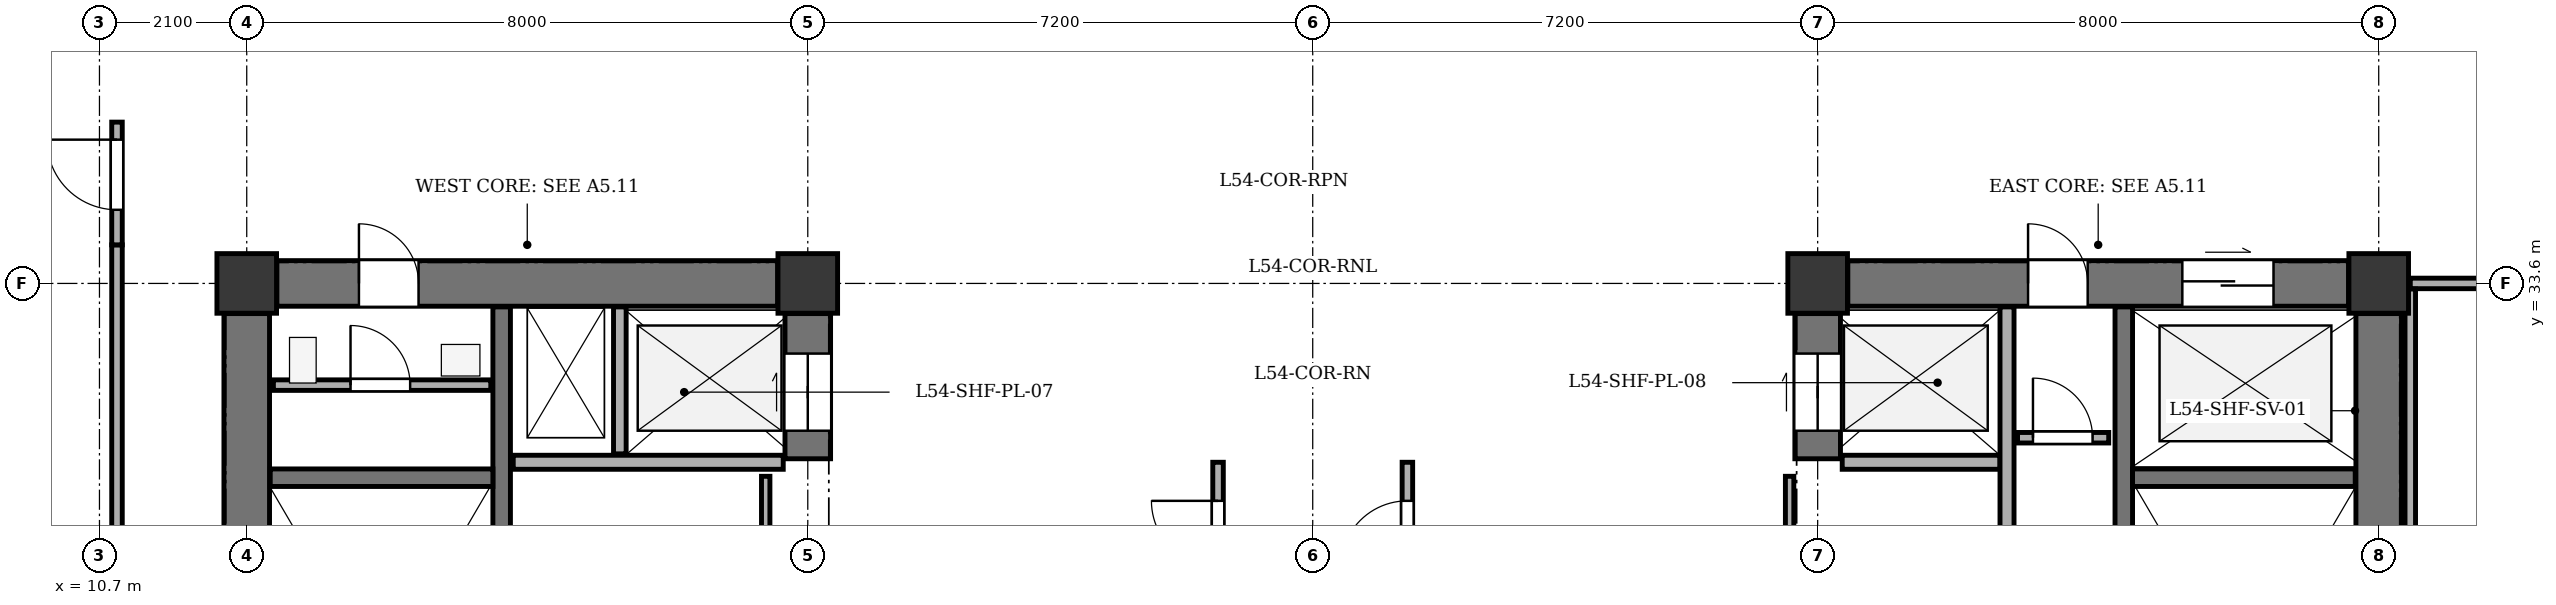
"""IFC4 building model, lengths in metres.
Left out: names, types, materials, properties, quantities, classifications, styles, units other than length and angle.
Written with IfcOpenShell. Run it as: python <this file> out.ifc"""

import sys

from ifc_helpers import new_model, si_unit, direction, frame, frame_2d, origin, origin_2d, place, context, subcontext, project, spatial, rectangle, extrude, element, fill, save


model = new_model("IFC4")
c1 = context("Model", 3, precision=1e-05, world=origin(), true_north=direction((0.0, 1.0)))
c2 = subcontext(c1, "Body", "Model", "MODEL_VIEW")
j1 = project(units=[si_unit("LENGTHUNIT", "METRE"), si_unit("PLANEANGLEUNIT", "RADIAN")], contexts=[c1])
p1 = place(None, origin())
s1 = spatial("IfcSite", under=j1, at=p1, CompositionType="ELEMENT")
p2 = place(p1, origin())
s2 = spatial("IfcBuilding", under=s1, at=p2, CompositionType="ELEMENT")
p3 = place(p2, frame((0.0, 0.0, 210.9)))
s3 = spatial("IfcBuildingStorey", under=s2, at=p3, CompositionType="ELEMENT", Elevation=210.9)
for number, where, z_axis, x_axis in (
    (1, (12.8, 33.6, 0.0), (0.0, 0.0, 1.0), (1.0, 0.0, 0.0)),
    (2, (20.8, 33.6, 0.0), (0.0, 0.0, 1.0), (1.0, 0.0, 0.0)),
    (3, (35.2, 33.6, 0.0), (0.0, 0.0, 1.0), (1.0, 0.0, 0.0)),
    (4, (43.2, 33.6, 0.0), (0.0, 0.0, 1.0), (1.0, 0.0, 0.0)),
):
    element("IfcColumn", number, at=place(p3, frame(where, z_axis=z_axis, x_axis=x_axis)), inside=s3, PredefinedType="COLUMN", context=c2, shape_type="SweptSolid", body=[
        extrude(rectangle(XDim=0.85, YDim=0.85, at=origin_2d()), origin(), (0.0, 0.0, 1.0), 3.4),
    ])
p4 = place(p3, frame((12.8, 21.23, 0.0), z_axis=(0.0, 0.0, 1.0), x_axis=(0.0, 1.0, 0.0)))
e5 = element("IfcWall", 5, at=p4, inside=s3, PredefinedType="SHEAR", context=c2, shape_type="SweptSolid", body=[
    extrude(rectangle(XDim=11.94, YDim=0.65, at=frame_2d((5.97, 0.0))), origin(), (0.0, 0.0, 1.0), 3.1),
])
p5 = place(p3, frame((13.23, 33.6, 0.0), z_axis=(0.0, 0.0, 1.0), x_axis=(1.0, 0.0, 0.0)))
e6 = element("IfcWall", 6, at=p5, inside=s3, PredefinedType="SHEAR", context=c2, shape_type="SweptSolid", body=[
    extrude(rectangle(XDim=7.14, YDim=0.65, at=frame_2d((3.57, 0.0))), origin(), (0.0, 0.0, 1.0), 3.1),
])
p6 = place(p5, frame((1.17, 0.0, 0.0)))
e7 = element("IfcOpeningElement", 7, at=p6, cuts=e6, PredefinedType="OPENING", context=c2, shape_type="SweptSolid", body=[
    extrude(rectangle(XDim=0.85, YDim=2.02, at=frame_2d((0.425, 1.01))), frame((0.0, 0.335, 0.0), z_axis=(0.0, -1.0, 0.0), x_axis=(1.0, 0.0, 0.0)), (0.0, 0.0, 1.0), 0.67),
])
p7 = place(p3, frame((20.8, 31.1, 0.0), z_axis=(0.0, 0.0, 1.0), x_axis=(0.0, 1.0, 0.0)))
e8 = element("IfcWall", 8, at=p7, inside=s3, PredefinedType="SHEAR", context=c2, shape_type="SweptSolid", body=[
    extrude(rectangle(XDim=2.07, YDim=0.65, at=frame_2d((1.035, 0.0))), origin(), (0.0, 0.0, 1.0), 3.1),
])
p8 = place(p7, frame((0.4, 0.0, 0.0)))
e9 = element("IfcOpeningElement", 9, at=p8, cuts=e8, PredefinedType="OPENING", context=c2, shape_type="SweptSolid", body=[
    extrude(rectangle(XDim=1.1, YDim=2.1, at=frame_2d((0.55, 1.05))), frame((0.0, 0.335, 0.0), z_axis=(0.0, -1.0, 0.0), x_axis=(1.0, 0.0, 0.0)), (0.0, 0.0, 1.0), 0.67),
])
p9 = place(p3, frame((16.435, 21.135, 0.0), z_axis=(0.0, 0.0, 1.0), x_axis=(0.0, 1.0, 0.0)))
e10 = element("IfcWall", 10, at=p9, inside=s3, PredefinedType="SHEAR", context=c2, shape_type="SweptSolid", body=[
    extrude(rectangle(XDim=12.13, YDim=0.25, at=frame_2d((6.065, 0.0))), origin(), (0.0, 0.0, 1.0), 3.1),
])
p10 = place(p9, frame((0.515, 0.0, 0.0)))
e11 = element("IfcOpeningElement", 11, at=p10, cuts=e10, PredefinedType="OPENING", context=c2, shape_type="SweptSolid", body=[
    extrude(rectangle(XDim=1.2, YDim=2.15, at=frame_2d((0.6, 1.075))), frame((0.0, 0.135, 0.0), z_axis=(0.0, -1.0, 0.0), x_axis=(1.0, 0.0, 0.0)), (0.0, 0.0, 1.0), 0.27),
])
p11 = place(p9, frame((2.665, 0.0, 0.0)))
e12 = element("IfcOpeningElement", 12, at=p11, cuts=e10, PredefinedType="OPENING", context=c2, shape_type="SweptSolid", body=[
    extrude(rectangle(XDim=1.15, YDim=2.15, at=frame_2d((0.575, 1.075))), frame((0.0, 0.135, 0.0), z_axis=(0.0, -1.0, 0.0), x_axis=(1.0, 0.0, 0.0)), (0.0, 0.0, 1.0), 0.27),
])
p12 = place(p3, frame((13.135, 30.83, 0.0), z_axis=(0.0, 0.0, 1.0), x_axis=(1.0, 0.0, 0.0)))
e13 = element("IfcWall", 13, at=p12, inside=s3, PredefinedType="SHEAR", context=c2, shape_type="SweptSolid", body=[
    extrude(rectangle(XDim=3.175, YDim=0.25, at=frame_2d((1.587, 0.0))), origin(), (0.0, 0.0, 1.0), 3.1),
])
p13 = place(p3, frame((16.6, 31.05, 0.0), z_axis=(0.0, 0.0, 1.0), x_axis=(1.0, 0.0, 0.0)))
e14 = element("IfcWall", 14, at=p13, inside=s3, PredefinedType="SOLIDWALL", context=c2, shape_type="SweptSolid", body=[
    extrude(rectangle(XDim=3.85, YDim=0.2, at=frame_2d((1.925, 0.0))), origin(), (0.0, 0.0, 1.0), 3.1),
])
p14 = place(p3, frame((18.12, 31.17, 0.0), z_axis=(0.0, 0.0, 1.0), x_axis=(0.0, 1.0, 0.0)))
e15 = element("IfcWall", 15, at=p14, inside=s3, PredefinedType="PARTITIONING", context=c2, shape_type="SweptSolid", body=[
    extrude(rectangle(XDim=2.095, YDim=0.18, at=frame_2d((1.047, 0.0))), origin(), (0.0, 0.0, 1.0), 3.1),
])
p15 = place(p3, frame((43.2, 21.23, 0.0), z_axis=(0.0, 0.0, 1.0), x_axis=(0.0, 1.0, 0.0)))
e16 = element("IfcWall", 16, at=p15, inside=s3, PredefinedType="SHEAR", context=c2, shape_type="SweptSolid", body=[
    extrude(rectangle(XDim=11.94, YDim=0.65, at=frame_2d((5.97, 0.0))), origin(), (0.0, 0.0, 1.0), 3.1),
])
p16 = place(p3, frame((35.63, 33.6, 0.0), z_axis=(0.0, 0.0, 1.0), x_axis=(1.0, 0.0, 0.0)))
e17 = element("IfcWall", 17, at=p16, inside=s3, PredefinedType="SHEAR", context=c2, shape_type="SweptSolid", body=[
    extrude(rectangle(XDim=7.14, YDim=0.65, at=frame_2d((3.57, 0.0))), origin(), (0.0, 0.0, 1.0), 3.1),
])
p17 = place(p16, frame((4.77, 0.0, 0.0)))
e18 = element("IfcOpeningElement", 18, at=p17, cuts=e17, PredefinedType="OPENING", context=c2, shape_type="SweptSolid", body=[
    extrude(rectangle(XDim=1.3, YDim=2.15, at=frame_2d((0.65, 1.075))), frame((0.0, 0.335, 0.0), z_axis=(0.0, -1.0, 0.0), x_axis=(1.0, 0.0, 0.0)), (0.0, 0.0, 1.0), 0.67),
])
p18 = place(p16, frame((2.57, 0.0, 0.0)))
e19 = element("IfcOpeningElement", 19, at=p18, cuts=e17, PredefinedType="OPENING", context=c2, shape_type="SweptSolid", body=[
    extrude(rectangle(XDim=0.85, YDim=2.02, at=frame_2d((0.425, 1.01))), frame((0.0, 0.335, 0.0), z_axis=(0.0, -1.0, 0.0), x_axis=(1.0, 0.0, 0.0)), (0.0, 0.0, 1.0), 0.67),
])
p19 = place(p3, frame((35.2, 31.1, 0.0), z_axis=(0.0, 0.0, 1.0), x_axis=(0.0, 1.0, 0.0)))
e20 = element("IfcWall", 20, at=p19, inside=s3, PredefinedType="SHEAR", context=c2, shape_type="SweptSolid", body=[
    extrude(rectangle(XDim=2.07, YDim=0.65, at=frame_2d((1.035, 0.0))), origin(), (0.0, 0.0, 1.0), 3.1),
])
p20 = place(p19, frame((0.4, 0.0, 0.0)))
e21 = element("IfcOpeningElement", 21, at=p20, cuts=e20, PredefinedType="OPENING", context=c2, shape_type="SweptSolid", body=[
    extrude(rectangle(XDim=1.1, YDim=2.1, at=frame_2d((0.55, 1.05))), frame((0.0, 0.335, 0.0), z_axis=(0.0, -1.0, 0.0), x_axis=(1.0, 0.0, 0.0)), (0.0, 0.0, 1.0), 0.67),
])
p21 = place(p3, frame((39.565, 21.135, 0.0), z_axis=(0.0, 0.0, 1.0), x_axis=(0.0, 1.0, 0.0)))
e22 = element("IfcWall", 22, at=p21, inside=s3, PredefinedType="SHEAR", context=c2, shape_type="SweptSolid", body=[
    extrude(rectangle(XDim=12.13, YDim=0.25, at=frame_2d((6.065, 0.0))), origin(), (0.0, 0.0, 1.0), 3.1),
])
p22 = place(p21, frame((0.515, 0.0, 0.0)))
e23 = element("IfcOpeningElement", 23, at=p22, cuts=e22, PredefinedType="OPENING", context=c2, shape_type="SweptSolid", body=[
    extrude(rectangle(XDim=1.2, YDim=2.15, at=frame_2d((0.6, 1.075))), frame((0.0, 0.135, 0.0), z_axis=(0.0, -1.0, 0.0), x_axis=(1.0, 0.0, 0.0)), (0.0, 0.0, 1.0), 0.27),
])
p23 = place(p21, frame((2.665, 0.0, 0.0)))
e24 = element("IfcOpeningElement", 24, at=p23, cuts=e22, PredefinedType="OPENING", context=c2, shape_type="SweptSolid", body=[
    extrude(rectangle(XDim=1.15, YDim=2.15, at=frame_2d((0.575, 1.075))), frame((0.0, 0.135, 0.0), z_axis=(0.0, -1.0, 0.0), x_axis=(1.0, 0.0, 0.0)), (0.0, 0.0, 1.0), 0.27),
])
p24 = place(p3, frame((39.69, 30.83, 0.0), z_axis=(0.0, 0.0, 1.0), x_axis=(1.0, 0.0, 0.0)))
e25 = element("IfcWall", 25, at=p24, inside=s3, PredefinedType="SHEAR", context=c2, shape_type="SweptSolid", body=[
    extrude(rectangle(XDim=3.175, YDim=0.25, at=frame_2d((1.587, 0.0))), origin(), (0.0, 0.0, 1.0), 3.1),
])
p25 = place(p3, frame((35.55, 31.05, 0.0), z_axis=(0.0, 0.0, 1.0), x_axis=(1.0, 0.0, 0.0)))
e26 = element("IfcWall", 26, at=p25, inside=s3, PredefinedType="SOLIDWALL", context=c2, shape_type="SweptSolid", body=[
    extrude(rectangle(XDim=2.25, YDim=0.2, at=frame_2d((1.125, 0.0))), origin(), (0.0, 0.0, 1.0), 3.1),
])
p26 = place(p3, frame((37.9, 25.27, 0.0), z_axis=(0.0, 0.0, 1.0), x_axis=(0.0, 1.0, 0.0)))
e27 = element("IfcWall", 27, at=p26, inside=s3, PredefinedType="SOLIDWALL", context=c2, shape_type="SweptSolid", body=[
    extrude(rectangle(XDim=7.995, YDim=0.2, at=frame_2d((3.998, 0.0))), origin(), (0.0, 0.0, 1.0), 3.1),
])
p27 = place(p3, frame((13.18, 32.15, 0.0), z_axis=(0.0, 0.0, 1.0), x_axis=(1.0, 0.0, 0.0)))
e28 = element("IfcWall", 28, at=p27, inside=s3, PredefinedType="PARTITIONING", context=c2, shape_type="SweptSolid", body=[
    extrude(rectangle(XDim=3.1, YDim=0.15, at=frame_2d((1.55, 0.0))), origin(), (0.0, 0.0, 1.0), 3.1),
])
p28 = place(p27, frame((1.1, 0.0, 0.0)))
e29 = element("IfcOpeningElement", 29, at=p28, cuts=e28, PredefinedType="OPENING", context=c2, shape_type="SweptSolid", body=[
    extrude(rectangle(XDim=0.85, YDim=2.02, at=frame_2d((0.425, 1.01))), frame((0.0, 0.085, 0.0), z_axis=(0.0, -1.0, 0.0), x_axis=(1.0, 0.0, 0.0)), (0.0, 0.0, 1.0), 0.17),
])
p29 = place(p3, frame((38.05, 31.4, 0.0), z_axis=(0.0, 0.0, 1.0), x_axis=(1.0, 0.0, 0.0)))
e30 = element("IfcWall", 30, at=p29, inside=s3, PredefinedType="PARTITIONING", context=c2, shape_type="SweptSolid", body=[
    extrude(rectangle(XDim=1.3, YDim=0.15, at=frame_2d((0.65, 0.0))), origin(), (0.0, 0.0, 1.0), 3.1),
])
p30 = place(p29, frame((0.22, 0.0, 0.0)))
e31 = element("IfcOpeningElement", 31, at=p30, cuts=e30, PredefinedType="OPENING", context=c2, shape_type="SweptSolid", body=[
    extrude(rectangle(XDim=0.85, YDim=2.02, at=frame_2d((0.425, 1.01))), frame((0.0, 0.085, 0.0), z_axis=(0.0, -1.0, 0.0), x_axis=(1.0, 0.0, 0.0)), (0.0, 0.0, 1.0), 0.17),
])
p31 = place(p3, frame((26.65, 25.23, 0.0), z_axis=(0.0, 0.0, 1.0), x_axis=(0.0, 1.0, 0.0)))
e32 = element("IfcWall", 32, at=p31, inside=s3, PredefinedType="PARTITIONING", context=c2, shape_type="SweptSolid", body=[
    extrude(rectangle(XDim=5.82, YDim=0.15, at=frame_2d((2.91, 0.0))), origin(), (0.0, 0.0, 1.0), 3.1),
])
p32 = place(p31, frame((1.42, 0.0, 0.0)))
e33 = element("IfcOpeningElement", 33, at=p32, cuts=e32, PredefinedType="OPENING", context=c2, shape_type="SweptSolid", body=[
    extrude(rectangle(XDim=0.95, YDim=2.1, at=frame_2d((0.475, 1.05))), frame((0.0, 0.085, 0.0), z_axis=(0.0, -1.0, 0.0), x_axis=(1.0, 0.0, 0.0)), (0.0, 0.0, 1.0), 0.17),
])
p33 = place(p31, frame((4.32, 0.0, 0.0)))
e34 = element("IfcOpeningElement", 34, at=p33, cuts=e32, PredefinedType="OPENING", context=c2, shape_type="SweptSolid", body=[
    extrude(rectangle(XDim=0.95, YDim=2.1, at=frame_2d((0.475, 1.05))), frame((0.0, 0.085, 0.0), z_axis=(0.0, -1.0, 0.0), x_axis=(1.0, 0.0, 0.0)), (0.0, 0.0, 1.0), 0.17),
])
p34 = place(p3, frame((20.2, 25.255, 0.0), z_axis=(0.0, 0.0, 1.0), x_axis=(0.0, 1.0, 0.0)))
e35 = element("IfcWall", 35, at=p34, inside=s3, PredefinedType="PARTITIONING", context=c2, shape_type="SweptSolid", body=[
    extrude(rectangle(XDim=5.595, YDim=0.12, at=frame_2d((2.798, 0.0))), origin(), (0.0, 0.0, 1.0), 3.1),
])
p35 = place(p34, frame((0.995, 0.0, 0.0)))
e36 = element("IfcOpeningElement", 36, at=p35, cuts=e35, PredefinedType="OPENING", context=c2, shape_type="SweptSolid", body=[
    extrude(rectangle(XDim=0.9, YDim=2.05, at=frame_2d((0.45, 1.025))), frame((0.0, 0.07, 0.0), z_axis=(0.0, -1.0, 0.0), x_axis=(1.0, 0.0, 0.0)), (0.0, 0.0, 1.0), 0.14),
])
p36 = place(p3, frame((29.35, 25.23, 0.0), z_axis=(0.0, 0.0, 1.0), x_axis=(0.0, 1.0, 0.0)))
e37 = element("IfcWall", 37, at=p36, inside=s3, PredefinedType="PARTITIONING", context=c2, shape_type="SweptSolid", body=[
    extrude(rectangle(XDim=5.82, YDim=0.15, at=frame_2d((2.91, 0.0))), origin(), (0.0, 0.0, 1.0), 3.1),
])
p37 = place(p36, frame((1.42, 0.0, 0.0)))
e38 = element("IfcOpeningElement", 38, at=p37, cuts=e37, PredefinedType="OPENING", context=c2, shape_type="SweptSolid", body=[
    extrude(rectangle(XDim=0.95, YDim=2.1, at=frame_2d((0.475, 1.05))), frame((0.0, 0.085, 0.0), z_axis=(0.0, -1.0, 0.0), x_axis=(1.0, 0.0, 0.0)), (0.0, 0.0, 1.0), 0.17),
])
p38 = place(p36, frame((4.32, 0.0, 0.0)))
e39 = element("IfcOpeningElement", 39, at=p38, cuts=e37, PredefinedType="OPENING", context=c2, shape_type="SweptSolid", body=[
    extrude(rectangle(XDim=0.95, YDim=2.1, at=frame_2d((0.475, 1.05))), frame((0.0, 0.085, 0.0), z_axis=(0.0, -1.0, 0.0), x_axis=(1.0, 0.0, 0.0)), (0.0, 0.0, 1.0), 0.17),
])
p39 = place(p3, frame((34.8, 25.25, 0.0), z_axis=(0.0, 0.0, 1.0), x_axis=(0.0, 1.0, 0.0)))
e40 = element("IfcWall", 40, at=p39, inside=s3, PredefinedType="PARTITIONING", context=c2, shape_type="SweptSolid", body=[
    extrude(rectangle(XDim=5.6, YDim=0.12, at=frame_2d((2.8, 0.0))), origin(), (0.0, 0.0, 1.0), 3.1),
])
p40 = place(p39, frame((1.0, 0.0, 0.0)))
e41 = element("IfcOpeningElement", 41, at=p40, cuts=e40, PredefinedType="OPENING", context=c2, shape_type="SweptSolid", body=[
    extrude(rectangle(XDim=0.9, YDim=2.05, at=frame_2d((0.45, 1.025))), frame((0.0, 0.07, 0.0), z_axis=(0.0, -1.0, 0.0), x_axis=(1.0, 0.0, 0.0)), (0.0, 0.0, 1.0), 0.14),
])
p41 = place(p3, frame((10.95, 20.25, 0.0), z_axis=(0.0, 0.0, 1.0), x_axis=(0.0, 1.0, 0.0)))
e42 = element("IfcWall", 42, at=p41, inside=s3, PredefinedType="PARTITIONING", context=c2, shape_type="SweptSolid", body=[
    extrude(rectangle(XDim=13.9, YDim=0.15, at=frame_2d((6.95, 0.0))), origin(), (0.0, 0.0, 1.0), 3.1),
])
p42 = place(p3, frame((10.95, 34.15, 0.0), z_axis=(0.0, 0.0, 1.0), x_axis=(0.0, 1.0, 0.0)))
e43 = element("IfcWall", 43, at=p42, inside=s3, PredefinedType="PARTITIONING", context=c2, shape_type="SweptSolid", body=[
    extrude(rectangle(XDim=1.75, YDim=0.15, at=frame_2d((0.875, 0.0))), origin(), (0.0, 0.0, 1.0), 3.1),
])
p43 = place(p42, frame((0.5, 0.0, 0.0)))
e44 = element("IfcOpeningElement", 44, at=p43, cuts=e43, PredefinedType="OPENING", context=c2, shape_type="SweptSolid", body=[
    extrude(rectangle(XDim=1.0, YDim=2.1, at=frame_2d((0.5, 1.05))), frame((0.0, 0.085, 0.0), z_axis=(0.0, -1.0, 0.0), x_axis=(1.0, 0.0, 0.0)), (0.0, 0.0, 1.0), 0.17),
])
p44 = place(p3, frame((43.65, 33.6, 0.0), z_axis=(0.0, 0.0, 1.0), x_axis=(1.0, 0.0, 0.0)))
e45 = element("IfcWall", 45, at=p44, inside=s3, PredefinedType="PARTITIONING", context=c2, shape_type="SweptSolid", body=[
    extrude(rectangle(XDim=5.305, YDim=0.15, at=frame_2d((2.653, 0.0))), origin(), (0.0, 0.0, 1.0), 2.535),
])
p45 = place(p3, frame((43.65, 20.25, 0.0), z_axis=(0.0, 0.0, 1.0), x_axis=(0.0, 1.0, 0.0)))
e46 = element("IfcWall", 46, at=p45, inside=s3, PredefinedType="PARTITIONING", context=c2, shape_type="SweptSolid", body=[
    extrude(rectangle(XDim=13.27, YDim=0.15, at=frame_2d((6.635, 0.0))), origin(), (0.0, 0.0, 1.0), 3.1),
])
p46 = place(p6, origin())
e47 = element("IfcDoor", 47, at=p46, inside=s3, OperationType="SINGLE_SWING_LEFT", PredefinedType="DOOR", context=c2, shape_type="SweptSolid", body=[
    extrude(rectangle(XDim=0.85, YDim=2.02, at=frame_2d((0.425, 1.01))), frame((0.0, 0.025, 0.0), z_axis=(0.0, -1.0, 0.0), x_axis=(1.0, 0.0, 0.0)), (0.0, 0.0, 1.0), 0.05),
])
fill(e7, e47)
p47 = place(p8, origin())
e48 = element("IfcDoor", 48, at=p47, inside=s3, OperationType="DOUBLE_DOOR_SLIDING", PredefinedType="DOOR", context=c2, shape_type="SweptSolid", body=[
    extrude(rectangle(XDim=1.1, YDim=2.1, at=frame_2d((0.55, 1.05))), frame((0.0, 0.025, 0.0), z_axis=(0.0, -1.0, 0.0), x_axis=(1.0, 0.0, 0.0)), (0.0, 0.0, 1.0), 0.05),
])
fill(e9, e48)
p48 = place(p17, origin())
e49 = element("IfcDoor", 49, at=p48, inside=s3, OperationType="DOUBLE_DOOR_SLIDING", PredefinedType="DOOR", context=c2, shape_type="SweptSolid", body=[
    extrude(rectangle(XDim=1.3, YDim=2.15, at=frame_2d((0.65, 1.075))), frame((0.0, 0.025, 0.0), z_axis=(0.0, -1.0, 0.0), x_axis=(1.0, 0.0, 0.0)), (0.0, 0.0, 1.0), 0.05),
])
fill(e18, e49)
p49 = place(p18, origin())
e50 = element("IfcDoor", 50, at=p49, inside=s3, OperationType="SINGLE_SWING_LEFT", PredefinedType="DOOR", context=c2, shape_type="SweptSolid", body=[
    extrude(rectangle(XDim=0.85, YDim=2.02, at=frame_2d((0.425, 1.01))), frame((0.0, 0.025, 0.0), z_axis=(0.0, -1.0, 0.0), x_axis=(1.0, 0.0, 0.0)), (0.0, 0.0, 1.0), 0.05),
])
fill(e19, e50)
p50 = place(p20, origin())
e51 = element("IfcDoor", 51, at=p50, inside=s3, OperationType="DOUBLE_DOOR_SLIDING", PredefinedType="DOOR", context=c2, shape_type="SweptSolid", body=[
    extrude(rectangle(XDim=1.1, YDim=2.1, at=frame_2d((0.55, 1.05))), frame((0.0, 0.025, 0.0), z_axis=(0.0, -1.0, 0.0), x_axis=(1.0, 0.0, 0.0)), (0.0, 0.0, 1.0), 0.05),
])
fill(e21, e51)
p51 = place(p28, origin())
e52 = element("IfcDoor", 52, at=p51, inside=s3, OperationType="SINGLE_SWING_LEFT", PredefinedType="DOOR", context=c2, shape_type="SweptSolid", body=[
    extrude(rectangle(XDim=0.85, YDim=2.02, at=frame_2d((0.425, 1.01))), frame((0.0, 0.025, 0.0), z_axis=(0.0, -1.0, 0.0), x_axis=(1.0, 0.0, 0.0)), (0.0, 0.0, 1.0), 0.05),
])
fill(e29, e52)
p52 = place(p30, origin())
e53 = element("IfcDoor", 53, at=p52, inside=s3, OperationType="SINGLE_SWING_LEFT", PredefinedType="DOOR", context=c2, shape_type="SweptSolid", body=[
    extrude(rectangle(XDim=0.85, YDim=2.02, at=frame_2d((0.425, 1.01))), frame((0.0, 0.025, 0.0), z_axis=(0.0, -1.0, 0.0), x_axis=(1.0, 0.0, 0.0)), (0.0, 0.0, 1.0), 0.05),
])
fill(e31, e53)
p53 = place(p33, origin())
e54 = element("IfcDoor", 54, at=p53, inside=s3, OperationType="SINGLE_SWING_RIGHT", PredefinedType="DOOR", context=c2, shape_type="SweptSolid", body=[
    extrude(rectangle(XDim=0.95, YDim=2.1, at=frame_2d((0.475, 1.05))), frame((0.0, 0.025, 0.0), z_axis=(0.0, -1.0, 0.0), x_axis=(1.0, 0.0, 0.0)), (0.0, 0.0, 1.0), 0.05),
])
fill(e34, e54)
p54 = place(p38, origin())
e55 = element("IfcDoor", 55, at=p54, inside=s3, OperationType="SINGLE_SWING_LEFT", PredefinedType="DOOR", context=c2, shape_type="SweptSolid", body=[
    extrude(rectangle(XDim=0.95, YDim=2.1, at=frame_2d((0.475, 1.05))), frame((0.0, 0.025, 0.0), z_axis=(0.0, -1.0, 0.0), x_axis=(1.0, 0.0, 0.0)), (0.0, 0.0, 1.0), 0.05),
])
fill(e39, e55)
p55 = place(p43, origin())
e56 = element("IfcDoor", 56, at=p55, inside=s3, OperationType="SINGLE_SWING_RIGHT", PredefinedType="DOOR", context=c2, shape_type="SweptSolid", body=[
    extrude(rectangle(XDim=1.0, YDim=2.1, at=frame_2d((0.5, 1.05))), frame((0.0, 0.025, 0.0), z_axis=(0.0, -1.0, 0.0), x_axis=(1.0, 0.0, 0.0)), (0.0, 0.0, 1.0), 0.05),
])
fill(e44, e56)
save(model, sys.argv[1])
